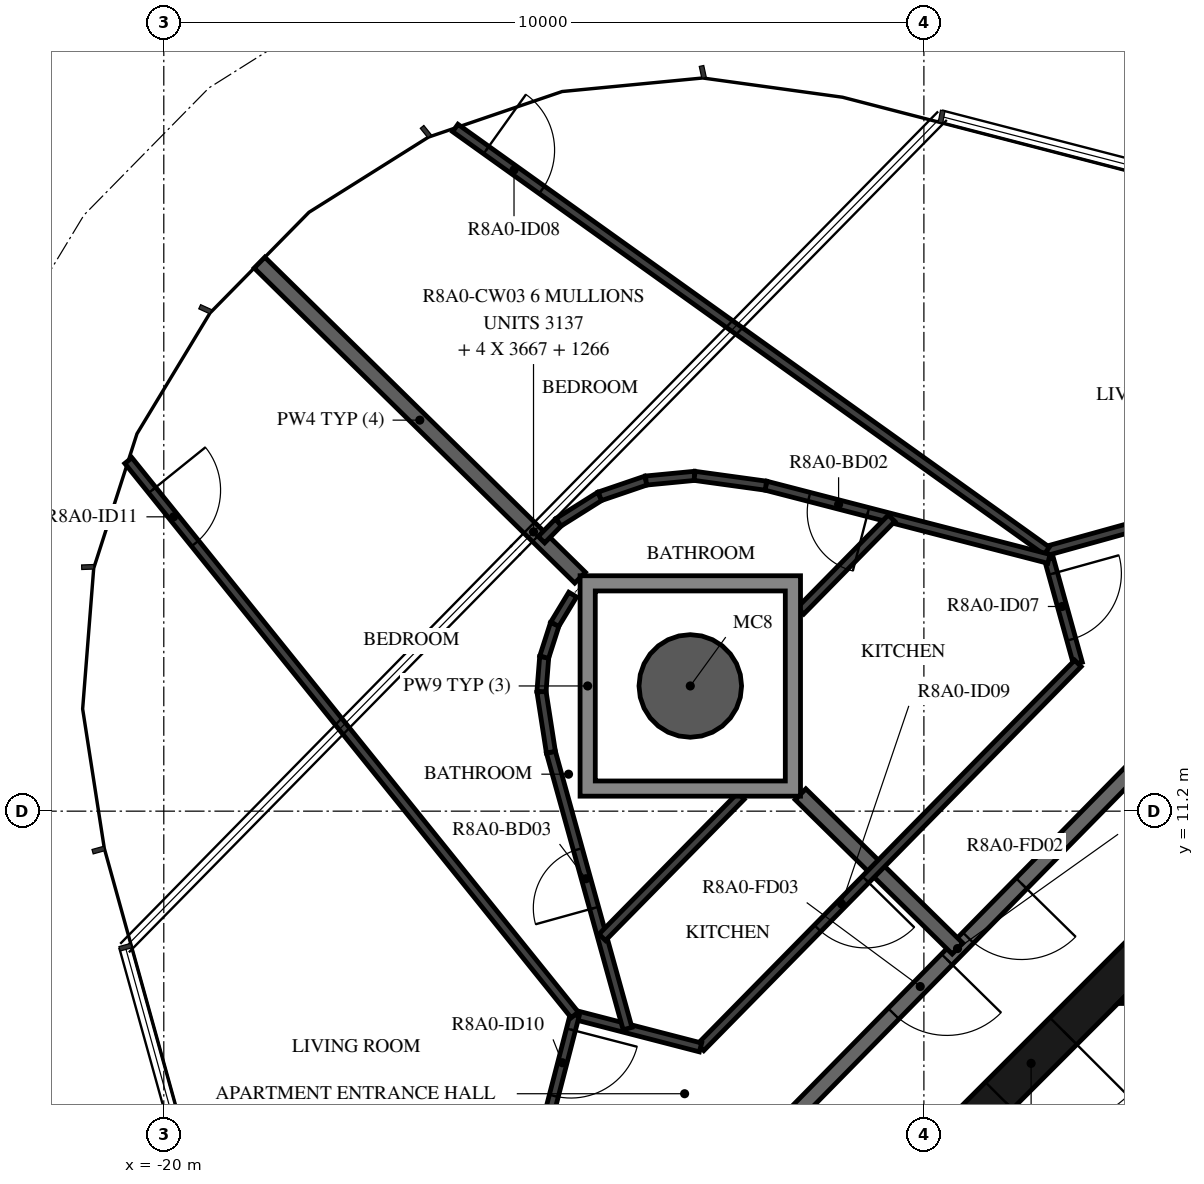
"""IFC4 building model, lengths in metres.
Left out: names, types, materials, properties, quantities, classifications, styles, units other than length and angle.
Written with IfcOpenShell. Run it as: python <this file> out.ifc"""

import sys

from ifc_helpers import new_model, si_unit, direction, frame, frame_2d, origin, origin_2d, place, context, subcontext, project, spatial, polyline, rectangle, hollow_circle, outline, extrude, element, fill, save


model = new_model("IFC4")
c1 = context("Model", 3, precision=1e-05, world=origin(), true_north=direction((0.0, 1.0)))
c2 = subcontext(c1, "Body", "Model", "MODEL_VIEW")
j1 = project(units=[si_unit("LENGTHUNIT", "METRE"), si_unit("PLANEANGLEUNIT", "RADIAN")], contexts=[c1])
p1 = place(None, origin())
s1 = spatial("IfcSite", under=j1, at=p1, CompositionType="ELEMENT")
p2 = place(p1, origin())
s2 = spatial("IfcBuilding", under=s1, at=p2, CompositionType="ELEMENT")
p3 = place(p2, frame((0.0, 0.0, 305.2)))
s3 = spatial("IfcBuildingStorey", under=s2, at=p3, CompositionType="ELEMENT", Elevation=305.2)
p4 = place(p3, frame((-13.073, 12.847, -0.38), z_axis=(0.0, 0.0, 1.0), x_axis=(1.0, 0.0, 0.0)))
e1 = element("IfcColumn", 1, at=p4, inside=s3, PredefinedType="COLUMN", context=c2, shape_type="SweptSolid", body=[
    extrude(hollow_circle(Radius=0.675, WallThickness=0.03, at=origin_2d()), origin(), (0.0, 0.0, 1.0), 3.5),
])
p5 = place(p3, frame((-7.164, 9.308, 0.0), z_axis=(0.0, 0.0, 1.0), x_axis=(-0.707106781187, -0.707106781187, 0.0)))
e2 = element("IfcWall", 2, at=p5, inside=s3, PredefinedType="SHEAR", context=c2, shape_type="SweptSolid", body=[
    extrude(rectangle(XDim=3.032, YDim=0.5, at=frame_2d((1.516, 0.0))), origin(), (0.0, 0.0, 1.0), 3.12),
])
p6 = place(p5, frame((1.416, 0.0, 0.0)))
e3 = element("IfcOpeningElement", 3, at=p6, cuts=e2, PredefinedType="OPENING", context=c2, shape_type="SweptSolid", body=[
    extrude(rectangle(XDim=1.2, YDim=2.1, at=frame_2d((0.6, 1.05))), frame((0.0, 0.26, 0.0), z_axis=(0.0, -1.0, 0.0), x_axis=(1.0, 0.0, 0.0)), (0.0, 0.0, 1.0), 0.52),
])
p7 = place(p3, origin())
e4 = element("IfcWall", 4, at=p7, inside=s3, PredefinedType="SHEAR", context=c2, shape_type="SweptSolid", body=[
    extrude(outline(polyline([(-7.148, 8.97), (-7.0, 8.97), (-7.0, 8.67), (-7.448, 8.67), (-7.148, 8.97)])), origin(), (0.0, 0.0, 1.0), 3.12),
])
p8 = place(p3, frame((-7.041, 11.953, 0.0), z_axis=(0.0, 0.0, 1.0), x_axis=(-0.70090916255, -0.713250549143, 0.0)))
e5 = element("IfcWall", 5, at=p8, inside=s3, PredefinedType="STANDARD", context=c2, shape_type="SweptSolid", body=[
    extrude(rectangle(XDim=7.181, YDim=0.2, at=frame_2d((3.59, 0.0))), origin(), (0.0, 0.0, 1.0), 3.12),
])
p9 = place(p8, frame((2.39, 0.0, 0.0)))
e6 = element("IfcOpeningElement", 6, at=p9, cuts=e5, PredefinedType="OPENING", context=c2, shape_type="SweptSolid", body=[
    extrude(rectangle(XDim=1.0, YDim=2.1, at=frame_2d((0.5, 1.05))), frame((0.0, 0.11, 0.0), z_axis=(0.0, -1.0, 0.0), x_axis=(1.0, 0.0, 0.0)), (0.0, 0.0, 1.0), 0.22),
])
p10 = place(p8, frame((3.791, 0.0, 0.0)))
e7 = element("IfcOpeningElement", 7, at=p10, cuts=e5, PredefinedType="OPENING", context=c2, shape_type="SweptSolid", body=[
    extrude(rectangle(XDim=1.0, YDim=2.1, at=frame_2d((0.5, 1.05))), frame((0.0, 0.11, 0.0), z_axis=(0.0, -1.0, 0.0), x_axis=(1.0, 0.0, 0.0)), (0.0, 0.0, 1.0), 0.22),
])
p11 = place(p3, frame((-11.623, 11.422, 0.0), z_axis=(0.0, 0.0, 1.0), x_axis=(0.713233657229, -0.700926351478, 0.0)))
e8 = element("IfcWall", 8, at=p11, inside=s3, PredefinedType="STANDARD", context=c2, shape_type="SweptSolid", body=[
    extrude(rectangle(XDim=2.896, YDim=0.2, at=frame_2d((1.448, 0.0))), origin(), (0.0, 0.0, 1.0), 3.12),
])
p12 = place(p3, frame((-18.741, 18.417, 0.0), z_axis=(0.0, 0.0, 1.0), x_axis=(0.713252414586, -0.700907264256, 0.0)))
e9 = element("IfcWall", 9, at=p12, inside=s3, PredefinedType="STANDARD", context=c2, shape_type="SweptSolid", body=[
    extrude(rectangle(XDim=5.913, YDim=0.2, at=frame_2d((2.957, 0.0))), origin(), (0.0, 0.0, 1.0), 3.12),
])
p13 = place(p3, frame((-6.746, 15.079, 0.0), z_axis=(0.0, 0.0, 1.0), x_axis=(-0.963624820233, -0.267258687102, 0.0)))
e10 = element("IfcWall", 10, at=p13, inside=s3, PredefinedType="PARTITIONING", context=c2, shape_type="SweptSolid", body=[
    extrude(rectangle(XDim=1.7, YDim=0.12, at=frame_2d((0.85, 0.0))), origin(), (0.0, 0.0, 1.0), 3.12),
])
p14 = place(p3, frame((-8.355, 14.519, 0.0), z_axis=(0.0, 0.0, 1.0), x_axis=(0.267052638692, -0.963681943469, 0.0)))
e11 = element("IfcWall", 11, at=p14, inside=s3, PredefinedType="PARTITIONING", context=c2, shape_type="SweptSolid", body=[
    extrude(rectangle(XDim=1.427, YDim=0.12, at=frame_2d((0.713, 0.0))), origin(), (0.0, 0.0, 1.0), 3.12),
])
p15 = place(p14, frame((0.2, 0.0, 0.0)))
e12 = element("IfcOpeningElement", 12, at=p15, cuts=e11, PredefinedType="OPENING", context=c2, shape_type="SweptSolid", body=[
    extrude(rectangle(XDim=0.9, YDim=2.1, at=frame_2d((0.45, 1.05))), frame((0.0, 0.07, 0.0), z_axis=(0.0, -1.0, 0.0), x_axis=(1.0, 0.0, 0.0)), (0.0, 0.0, 1.0), 0.14),
])
p16 = place(p3, frame((-7.974, 13.144, 0.0), z_axis=(0.0, 0.0, 1.0), x_axis=(-0.700910366085, -0.713249366432, 0.0)))
e13 = element("IfcWall", 13, at=p16, inside=s3, PredefinedType="PARTITIONING", context=c2, shape_type="SweptSolid", body=[
    extrude(rectangle(XDim=7.083, YDim=0.12, at=frame_2d((3.542, 0.0))), origin(), (0.0, 0.0, 1.0), 3.12),
])
p17 = place(p16, frame((3.986, 0.0, 0.0)))
e14 = element("IfcOpeningElement", 14, at=p17, cuts=e13, PredefinedType="OPENING", context=c2, shape_type="SweptSolid", body=[
    extrude(rectangle(XDim=0.9, YDim=2.1, at=frame_2d((0.45, 1.05))), frame((0.0, 0.07, 0.0), z_axis=(0.0, -1.0, 0.0), x_axis=(1.0, 0.0, 0.0)), (0.0, 0.0, 1.0), 0.14),
])
p18 = place(p3, frame((-16.165, 20.188, 0.0), z_axis=(0.0, 0.0, 1.0), x_axis=(0.813459166979, -0.581622028175, 0.0)))
e15 = element("IfcWall", 15, at=p18, inside=s3, PredefinedType="PARTITIONING", context=c2, shape_type="SweptSolid", body=[
    extrude(rectangle(XDim=9.565, YDim=0.12, at=frame_2d((4.782, 0.0))), origin(), (0.0, 0.0, 1.0), 3.12),
])
p19 = place(p18, frame((0.5, 0.0, 0.0)))
e16 = element("IfcOpeningElement", 16, at=p19, cuts=e15, PredefinedType="OPENING", context=c2, shape_type="SweptSolid", body=[
    extrude(rectangle(XDim=0.9, YDim=2.1, at=frame_2d((0.45, 1.05))), frame((0.0, 0.07, 0.0), z_axis=(0.0, -1.0, 0.0), x_axis=(1.0, 0.0, 0.0)), (0.0, 0.0, 1.0), 0.14),
])
p20 = place(p3, frame((-8.355, 14.519, 0.0), z_axis=(0.0, 0.0, 1.0), x_axis=(-0.968146911612, 0.250382821969, 0.0)))
e17 = element("IfcWall", 17, at=p20, inside=s3, PredefinedType="PARTITIONING", context=c2, shape_type="SweptSolid", body=[
    extrude(rectangle(XDim=3.847, YDim=0.12, at=frame_2d((1.923, 0.0))), origin(), (0.0, 0.0, 1.0), 3.12),
])
p21 = place(p20, frame((2.458, 0.0, 0.0)))
e18 = element("IfcOpeningElement", 18, at=p21, cuts=e17, PredefinedType="OPENING", context=c2, shape_type="SweptSolid", body=[
    extrude(rectangle(XDim=0.8, YDim=2.1, at=frame_2d((0.4, 1.05))), frame((0.0, 0.07, 0.0), z_axis=(0.0, -1.0, 0.0), x_axis=(1.0, 0.0, 0.0)), (0.0, 0.0, 1.0), 0.14),
])
p22 = place(p3, frame((-10.425, 15.054, 0.0), z_axis=(0.0, 0.0, 1.0), x_axis=(-0.700866383264, -0.713292585698, 0.0)))
e19 = element("IfcWall", 19, at=p22, inside=s3, PredefinedType="PARTITIONING", context=c2, shape_type="SweptSolid", body=[
    extrude(rectangle(XDim=1.709, YDim=0.12, at=frame_2d((0.854, 0.0))), origin(), (0.0, 0.0, 1.0), 3.12),
])
p23 = place(p3, frame((-15.032, 14.772, 0.0), z_axis=(0.0, 0.0, 1.0), x_axis=(0.701378407906, 0.712789119532, 0.0)))
e20 = element("IfcWall", 20, at=p23, inside=s3, PredefinedType="PARTITIONING", context=c2, shape_type="SweptSolid", body=[
    extrude(rectangle(XDim=0.321, YDim=0.12, at=frame_2d((0.161, 0.0))), origin(), (0.0, 0.0, 1.0), 3.12),
])
p24 = place(p3, frame((-14.807, 15.0, 0.0), z_axis=(0.0, 0.0, 1.0), x_axis=(0.846499451836, 0.532389592349, 0.0)))
e21 = element("IfcWall", 21, at=p24, inside=s3, PredefinedType="PARTITIONING", context=c2, shape_type="SweptSolid", body=[
    extrude(rectangle(XDim=0.642, YDim=0.12, at=frame_2d((0.321, 0.0))), origin(), (0.0, 0.0, 1.0), 3.12),
])
for number, where, z_axis, x_axis in (
    (22, (-14.263, 15.342, 0.0), (0.0, 0.0, 1.0), (0.946, 0.323, 0.0)),
    (23, (-13.656, 15.55, 0.0), (0.0, 0.0, 1.0), (0.995, 0.096, 0.0)),
):
    element("IfcWall", number, at=place(p3, frame(where, z_axis=z_axis, x_axis=x_axis)), inside=s3, PredefinedType="PARTITIONING", context=c2, shape_type="SweptSolid", body=[
        extrude(rectangle(XDim=0.642, YDim=0.12, at=frame_2d((0.321, 0.0))), origin(), (0.0, 0.0, 1.0), 3.12),
    ])
p25 = place(p3, frame((-13.017, 15.611, 0.0), z_axis=(0.0, 0.0, 1.0), x_axis=(0.990688406717, -0.136148745119, 0.0)))
e24 = element("IfcWall", 24, at=p25, inside=s3, PredefinedType="PARTITIONING", context=c2, shape_type="SweptSolid", body=[
    extrude(rectangle(XDim=0.947, YDim=0.12, at=frame_2d((0.473, 0.0))), origin(), (0.0, 0.0, 1.0), 3.12),
])
p26 = place(p3, frame((-12.939, 8.092, 0.0), z_axis=(0.0, 0.0, 1.0), x_axis=(-0.968179141411, 0.250258166974, 0.0)))
e25 = element("IfcWall", 25, at=p26, inside=s3, PredefinedType="PARTITIONING", context=c2, shape_type="SweptSolid", body=[
    extrude(rectangle(XDim=1.709, YDim=0.12, at=frame_2d((0.854, 0.0))), origin(), (0.0, 0.0, 1.0), 3.12),
])
p27 = place(p3, frame((-14.594, 8.519, 0.0), z_axis=(0.0, 0.0, 1.0), x_axis=(-0.250468695288, -0.968124698931, 0.0)))
e26 = element("IfcWall", 26, at=p27, inside=s3, PredefinedType="PARTITIONING", context=c2, shape_type="SweptSolid", body=[
    extrude(rectangle(XDim=1.7, YDim=0.12, at=frame_2d((0.85, 0.0))), origin(), (0.0, 0.0, 1.0), 3.12),
])
p28 = place(p27, frame((0.2, 0.0, 0.0)))
e27 = element("IfcOpeningElement", 27, at=p28, cuts=e26, PredefinedType="OPENING", context=c2, shape_type="SweptSolid", body=[
    extrude(rectangle(XDim=0.9, YDim=2.1, at=frame_2d((0.45, 1.05))), frame((0.0, 0.07, 0.0), z_axis=(0.0, -1.0, 0.0), x_axis=(1.0, 0.0, 0.0)), (0.0, 0.0, 1.0), 0.14),
])
p29 = place(p3, frame((-13.899, 8.34, 0.0), z_axis=(0.0, 0.0, 1.0), x_axis=(-0.267286775597, 0.963617029525, 0.0)))
e28 = element("IfcWall", 28, at=p29, inside=s3, PredefinedType="PARTITIONING", context=c2, shape_type="SweptSolid", body=[
    extrude(rectangle(XDim=3.773, YDim=0.12, at=frame_2d((1.887, 0.0))), origin(), (0.0, 0.0, 1.0), 3.12),
])
p30 = place(p29, frame((1.646, 0.0, 0.0)))
e29 = element("IfcOpeningElement", 29, at=p30, cuts=e28, PredefinedType="OPENING", context=c2, shape_type="SweptSolid", body=[
    extrude(rectangle(XDim=0.8, YDim=2.1, at=frame_2d((0.4, 1.05))), frame((0.0, 0.07, 0.0), z_axis=(0.0, -1.0, 0.0), x_axis=(1.0, 0.0, 0.0)), (0.0, 0.0, 1.0), 0.14),
])
p31 = place(p3, frame((-14.907, 11.976, 0.0), z_axis=(0.0, 0.0, 1.0), x_axis=(-0.153398456533, 0.988164416245, 0.0)))
e30 = element("IfcWall", 30, at=p31, inside=s3, PredefinedType="PARTITIONING", context=c2, shape_type="SweptSolid", body=[
    extrude(rectangle(XDim=0.807, YDim=0.12, at=frame_2d((0.403, 0.0))), origin(), (0.0, 0.0, 1.0), 3.12),
])
for number, where, z_axis, x_axis in (
    (31, (-15.031, 12.773, 0.0), (0.0, 0.0, 1.0), (0.078, 0.997, 0.0)),
    (32, (-14.995, 13.227, 0.0), (0.0, 0.0, 1.0), (0.306, 0.952, 0.0)),
    (33, (-14.856, 13.66, 0.0), (0.0, 0.0, 1.0), (0.518, 0.855, 0.0)),
):
    element("IfcWall", number, at=place(p3, frame(where, z_axis=z_axis, x_axis=x_axis)), inside=s3, PredefinedType="PARTITIONING", context=c2, shape_type="SweptSolid", body=[
        extrude(rectangle(XDim=0.455, YDim=0.12, at=frame_2d((0.228, 0.0))), origin(), (0.0, 0.0, 1.0), 3.12),
    ])
p32 = place(p3, frame((-20.466, 15.812, 0.0), z_axis=(0.0, 0.0, 1.0), x_axis=(0.62719424473, -0.77886287585, 0.0)))
e34 = element("IfcWall", 34, at=p32, inside=s3, PredefinedType="PARTITIONING", context=c2, shape_type="SweptSolid", body=[
    extrude(rectangle(XDim=9.364, YDim=0.12, at=frame_2d((4.682, 0.0))), origin(), (0.0, 0.0, 1.0), 3.12),
])
p33 = place(p32, frame((0.5, 0.0, 0.0)))
e35 = element("IfcOpeningElement", 35, at=p33, cuts=e34, PredefinedType="OPENING", context=c2, shape_type="SweptSolid", body=[
    extrude(rectangle(XDim=0.9, YDim=2.1, at=frame_2d((0.45, 1.05))), frame((0.0, 0.07, 0.0), z_axis=(0.0, -1.0, 0.0), x_axis=(1.0, 0.0, 0.0)), (0.0, 0.0, 1.0), 0.14),
])
p34 = place(p3, frame((-14.232, 9.54, 0.0), z_axis=(0.0, 0.0, 1.0), x_axis=(0.700890401548, 0.713268985038, 0.0)))
e36 = element("IfcWall", 36, at=p34, inside=s3, PredefinedType="PARTITIONING", context=c2, shape_type="SweptSolid", body=[
    extrude(rectangle(XDim=2.604, YDim=0.12, at=frame_2d((1.302, 0.0))), origin(), (0.0, 0.0, 1.0), 3.12),
])
p35 = place(p3, origin())
e37 = element("IfcWall", 37, at=p35, inside=s3, PredefinedType="STANDARD", context=c2, shape_type="SweptSolid", body=[
    extrude(outline(polyline([(-11.623, 14.297), (-11.623, 11.397), (-14.523, 11.397), (-14.523, 14.297), (-11.623, 14.297)]), holes=[polyline([(-14.323, 11.597), (-11.823, 11.597), (-11.823, 14.097), (-14.323, 14.097), (-14.323, 11.597)])]), origin(), (0.0, 0.0, 1.0), 3.12),
])
p36 = place(p6, origin())
e38 = element("IfcDoor", 38, at=p36, inside=s3, OperationType="SINGLE_SWING_RIGHT", PredefinedType="DOOR", context=c2, shape_type="SweptSolid", body=[
    extrude(rectangle(XDim=1.2, YDim=2.1, at=frame_2d((0.6, 1.05))), frame((0.0, 0.025, 0.0), z_axis=(0.0, -1.0, 0.0), x_axis=(1.0, 0.0, 0.0)), (0.0, 0.0, 1.0), 0.05),
])
fill(e3, e38)
p37 = place(p9, origin())
e39 = element("IfcDoor", 39, at=p37, inside=s3, OperationType="SINGLE_SWING_RIGHT", PredefinedType="DOOR", context=c2, shape_type="SweptSolid", body=[
    extrude(rectangle(XDim=1.0, YDim=2.1, at=frame_2d((0.5, 1.05))), frame((0.0, 0.025, 0.0), z_axis=(0.0, -1.0, 0.0), x_axis=(1.0, 0.0, 0.0)), (0.0, 0.0, 1.0), 0.05),
])
fill(e6, e39)
p38 = place(p15, origin())
e40 = element("IfcDoor", 40, at=p38, inside=s3, OperationType="SINGLE_SWING_LEFT", PredefinedType="DOOR", context=c2, shape_type="SweptSolid", body=[
    extrude(rectangle(XDim=0.9, YDim=2.1, at=frame_2d((0.45, 1.05))), frame((0.0, 0.025, 0.0), z_axis=(0.0, -1.0, 0.0), x_axis=(1.0, 0.0, 0.0)), (0.0, 0.0, 1.0), 0.05),
])
fill(e12, e40)
p39 = place(p19, origin())
e41 = element("IfcDoor", 41, at=p39, inside=s3, OperationType="SINGLE_SWING_RIGHT", PredefinedType="DOOR", context=c2, shape_type="SweptSolid", body=[
    extrude(rectangle(XDim=0.9, YDim=2.1, at=frame_2d((0.45, 1.05))), frame((0.0, 0.025, 0.0), z_axis=(0.0, -1.0, 0.0), x_axis=(1.0, 0.0, 0.0)), (0.0, 0.0, 1.0), 0.05),
])
fill(e16, e41)
p40 = place(p21, origin())
e42 = element("IfcDoor", 42, at=p40, inside=s3, OperationType="SINGLE_SWING_LEFT", PredefinedType="DOOR", context=c2, shape_type="SweptSolid", body=[
    extrude(rectangle(XDim=0.8, YDim=2.1, at=frame_2d((0.4, 1.05))), frame((0.0, 0.025, 0.0), z_axis=(0.0, -1.0, 0.0), x_axis=(1.0, 0.0, 0.0)), (0.0, 0.0, 1.0), 0.05),
])
fill(e18, e42)
p41 = place(p10, origin())
e43 = element("IfcDoor", 43, at=p41, inside=s3, OperationType="SINGLE_SWING_LEFT", PredefinedType="DOOR", context=c2, shape_type="SweptSolid", body=[
    extrude(rectangle(XDim=1.0, YDim=2.1, at=frame_2d((0.5, 1.05))), frame((0.0, 0.025, 0.0), z_axis=(0.0, -1.0, 0.0), x_axis=(1.0, 0.0, 0.0)), (0.0, 0.0, 1.0), 0.05),
])
fill(e7, e43)
p42 = place(p17, origin())
e44 = element("IfcDoor", 44, at=p42, inside=s3, OperationType="SINGLE_SWING_LEFT", PredefinedType="DOOR", context=c2, shape_type="SweptSolid", body=[
    extrude(rectangle(XDim=0.9, YDim=2.1, at=frame_2d((0.45, 1.05))), frame((0.0, 0.025, 0.0), z_axis=(0.0, -1.0, 0.0), x_axis=(1.0, 0.0, 0.0)), (0.0, 0.0, 1.0), 0.05),
])
fill(e14, e44)
p43 = place(p28, origin())
e45 = element("IfcDoor", 45, at=p43, inside=s3, OperationType="SINGLE_SWING_LEFT", PredefinedType="DOOR", context=c2, shape_type="SweptSolid", body=[
    extrude(rectangle(XDim=0.9, YDim=2.1, at=frame_2d((0.45, 1.05))), frame((0.0, 0.025, 0.0), z_axis=(0.0, -1.0, 0.0), x_axis=(1.0, 0.0, 0.0)), (0.0, 0.0, 1.0), 0.05),
])
fill(e27, e45)
p44 = place(p33, origin())
e46 = element("IfcDoor", 46, at=p44, inside=s3, OperationType="SINGLE_SWING_LEFT", PredefinedType="DOOR", context=c2, shape_type="SweptSolid", body=[
    extrude(rectangle(XDim=0.9, YDim=2.1, at=frame_2d((0.45, 1.05))), frame((0.0, 0.025, 0.0), z_axis=(0.0, -1.0, 0.0), x_axis=(1.0, 0.0, 0.0)), (0.0, 0.0, 1.0), 0.05),
])
fill(e35, e46)
p45 = place(p30, origin())
e47 = element("IfcDoor", 47, at=p45, inside=s3, OperationType="SINGLE_SWING_RIGHT", PredefinedType="DOOR", context=c2, shape_type="SweptSolid", body=[
    extrude(rectangle(XDim=0.8, YDim=2.1, at=frame_2d((0.4, 1.05))), frame((0.0, 0.025, 0.0), z_axis=(0.0, -1.0, 0.0), x_axis=(1.0, 0.0, 0.0)), (0.0, 0.0, 1.0), 0.05),
])
fill(e29, e47)
save(model, sys.argv[1])
